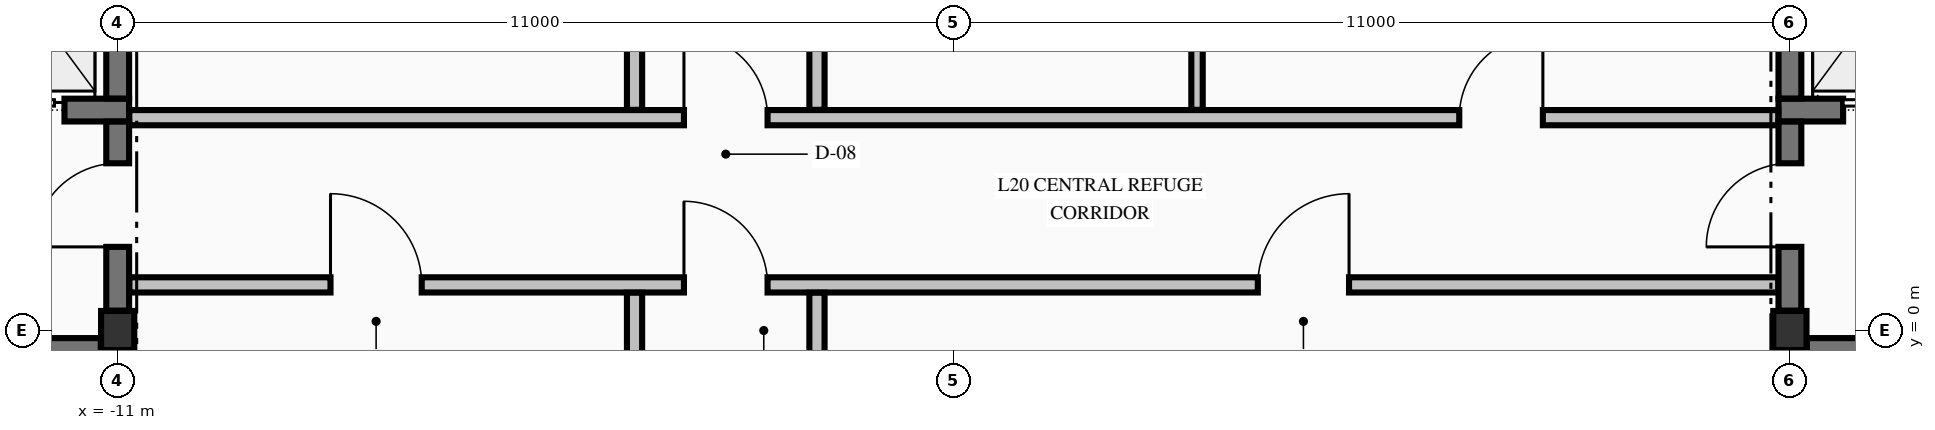
"""IFC4 building model, lengths in metres.
Left out: names, types, materials, properties, quantities, classifications, styles, units other than length and angle.
Written with IfcOpenShell. Run it as: python <this file> out.ifc"""

import sys

from ifc_helpers import new_model, si_unit, direction, frame, frame_2d, origin, origin_2d, place, context, subcontext, project, spatial, rectangle, i_section, extrude, element, fill, save


model = new_model("IFC4")
c1 = context("Model", 3, precision=1e-05, world=origin(), true_north=direction((0.0, 1.0)))
c2 = subcontext(c1, "Body", "Model", "MODEL_VIEW")
j1 = project(units=[si_unit("LENGTHUNIT", "METRE"), si_unit("PLANEANGLEUNIT", "RADIAN")], contexts=[c1])
p1 = place(None, origin())
s1 = spatial("IfcSite", under=j1, at=p1, CompositionType="ELEMENT")
p2 = place(p1, origin())
s2 = spatial("IfcBuilding", under=s1, at=p2, CompositionType="ELEMENT")
p3 = place(p2, frame((0.0, 0.0, 82.18)))
s3 = spatial("IfcBuildingStorey", under=s2, at=p3, CompositionType="ELEMENT", Elevation=82.18)
for number, where, z_axis, x_axis in (
    (1, (-11.0, 0.0, -0.425), (0.0, 0.0, 1.0), (1.0, 0.0, 0.0)),
    (2, (11.0, 0.0, -0.425), (0.0, 0.0, 1.0), (1.0, 0.0, 0.0)),
):
    element("IfcColumn", number, at=place(p3, frame(where, z_axis=z_axis, x_axis=x_axis)), inside=s3, PredefinedType="COLUMN", context=c2, shape_type="SweptSolid", body=[
        extrude(i_section(OverallWidth=0.437, OverallDepth=0.514, WebThickness=0.061, FlangeThickness=0.097, FilletRadius=0.015, at=origin_2d()), origin(), (0.0, 0.0, 1.0), 4.76),
    ])
p4 = place(p3, frame((-19.778, -0.25, 0.0), z_axis=(0.0, 0.0, 1.0), x_axis=(1.0, 0.0, 0.0)))
e3 = element("IfcWall", 3, at=p4, inside=s3, PredefinedType="SHEAR", context=c2, shape_type="SweptSolid", body=[
    extrude(rectangle(XDim=8.555, YDim=0.3, at=frame_2d((4.278, 0.0))), origin(), (0.0, 0.0, 1.0), 4.335),
])
p5 = place(p4, frame((6.077, 0.0, 0.0)))
e4 = element("IfcOpeningElement", 4, at=p5, cuts=e3, PredefinedType="OPENING", context=c2, shape_type="SweptSolid", body=[
    extrude(rectangle(XDim=1.1, YDim=2.15, at=frame_2d((0.55, 1.075))), frame((0.0, 0.16, 0.0), z_axis=(0.0, -1.0, 0.0), x_axis=(1.0, 0.0, 0.0)), (0.0, 0.0, 1.0), 0.32),
])
p6 = place(p3, frame((11.222, -0.25, 0.0), z_axis=(0.0, 0.0, 1.0), x_axis=(1.0, 0.0, 0.0)))
e5 = element("IfcWall", 5, at=p6, inside=s3, PredefinedType="SHEAR", context=c2, shape_type="SweptSolid", body=[
    extrude(rectangle(XDim=3.653, YDim=0.3, at=frame_2d((1.826, 0.0))), origin(), (0.0, 0.0, 1.0), 4.335),
])
p7 = place(p6, frame((1.377, 0.0, 0.0)))
e6 = element("IfcOpeningElement", 6, at=p7, cuts=e5, PredefinedType="OPENING", context=c2, shape_type="SweptSolid", body=[
    extrude(rectangle(XDim=1.1, YDim=2.15, at=frame_2d((0.55, 1.075))), frame((0.0, 0.16, 0.0), z_axis=(0.0, -1.0, 0.0), x_axis=(1.0, 0.0, 0.0)), (0.0, 0.0, 1.0), 0.32),
])
p8 = place(p3, frame((-14.875, 2.9, 0.0), z_axis=(0.0, 0.0, 1.0), x_axis=(1.0, 0.0, 0.0)))
e7 = element("IfcWall", 7, at=p8, inside=s3, PredefinedType="SHEAR", context=c2, shape_type="SweptSolid", body=[
    extrude(rectangle(XDim=4.025, YDim=0.3, at=frame_2d((2.012, 0.0))), origin(), (0.0, 0.0, 1.0), 4.335),
])
p9 = place(p8, frame((2.075, 0.0, 0.0)))
e8 = element("IfcOpeningElement", 8, at=p9, cuts=e7, PredefinedType="OPENING", context=c2, shape_type="SweptSolid", body=[
    extrude(rectangle(XDim=1.1, YDim=2.2, at=frame_2d((0.55, 1.1))), frame((0.0, 0.16, 0.0), z_axis=(0.0, -1.0, 0.0), x_axis=(1.0, 0.0, 0.0)), (0.0, 0.0, 1.0), 0.32),
])
p10 = place(p3, frame((10.85, 2.9, 0.0), z_axis=(0.0, 0.0, 1.0), x_axis=(1.0, 0.0, 0.0)))
e9 = element("IfcWall", 9, at=p10, inside=s3, PredefinedType="SHEAR", context=c2, shape_type="SweptSolid", body=[
    extrude(rectangle(XDim=4.025, YDim=0.3, at=frame_2d((2.012, 0.0))), origin(), (0.0, 0.0, 1.0), 4.335),
])
p11 = place(p10, frame((0.85, 0.0, 0.0)))
e10 = element("IfcOpeningElement", 10, at=p11, cuts=e9, PredefinedType="OPENING", context=c2, shape_type="SweptSolid", body=[
    extrude(rectangle(XDim=1.1, YDim=2.2, at=frame_2d((0.55, 1.1))), frame((0.0, 0.16, 0.0), z_axis=(0.0, -1.0, 0.0), x_axis=(1.0, 0.0, 0.0)), (0.0, 0.0, 1.0), 0.32),
])
p12 = place(p3, frame((-10.847, 0.6, 0.0), z_axis=(0.0, 0.0, 1.0), x_axis=(1.0, 0.0, 0.0)))
e11 = element("IfcWall", 11, at=p12, inside=s3, PredefinedType="PARTITIONING", context=c2, shape_type="SweptSolid", body=[
    extrude(rectangle(XDim=21.694, YDim=0.2, at=frame_2d((10.847, 0.0))), origin(), (0.0, 0.0, 1.0), 4.335),
])
p13 = place(p12, frame((7.297, 0.0, 0.0)))
e12 = element("IfcOpeningElement", 12, at=p13, cuts=e11, PredefinedType="OPENING", context=c2, shape_type="SweptSolid", body=[
    extrude(rectangle(XDim=1.1, YDim=2.15, at=frame_2d((0.55, 1.075))), frame((0.0, 0.11, 0.0), z_axis=(0.0, -1.0, 0.0), x_axis=(1.0, 0.0, 0.0)), (0.0, 0.0, 1.0), 0.22),
])
p14 = place(p12, frame((2.647, 0.0, 0.0)))
e13 = element("IfcOpeningElement", 13, at=p14, cuts=e11, PredefinedType="OPENING", context=c2, shape_type="SweptSolid", body=[
    extrude(rectangle(XDim=1.2, YDim=2.15, at=frame_2d((0.6, 1.075))), frame((0.0, 0.11, 0.0), z_axis=(0.0, -1.0, 0.0), x_axis=(1.0, 0.0, 0.0)), (0.0, 0.0, 1.0), 0.22),
])
p15 = place(p12, frame((14.847, 0.0, 0.0)))
e14 = element("IfcOpeningElement", 14, at=p15, cuts=e11, PredefinedType="OPENING", context=c2, shape_type="SweptSolid", body=[
    extrude(rectangle(XDim=1.2, YDim=2.15, at=frame_2d((0.6, 1.075))), frame((0.0, 0.11, 0.0), z_axis=(0.0, -1.0, 0.0), x_axis=(1.0, 0.0, 0.0)), (0.0, 0.0, 1.0), 0.22),
])
p16 = place(p3, frame((-10.847, 2.8, 0.0), z_axis=(0.0, 0.0, 1.0), x_axis=(1.0, 0.0, 0.0)))
e15 = element("IfcWall", 15, at=p16, inside=s3, PredefinedType="PARTITIONING", context=c2, shape_type="SweptSolid", body=[
    extrude(rectangle(XDim=21.694, YDim=0.2, at=frame_2d((10.847, 0.0))), origin(), (0.0, 0.0, 1.0), 4.335),
])
p17 = place(p16, frame((7.297, 0.0, 0.0)))
e16 = element("IfcOpeningElement", 16, at=p17, cuts=e15, PredefinedType="OPENING", context=c2, shape_type="SweptSolid", body=[
    extrude(rectangle(XDim=1.1, YDim=2.15, at=frame_2d((0.55, 1.075))), frame((0.0, 0.11, 0.0), z_axis=(0.0, -1.0, 0.0), x_axis=(1.0, 0.0, 0.0)), (0.0, 0.0, 1.0), 0.22),
])
p18 = place(p16, frame((17.497, 0.0, 0.0)))
e17 = element("IfcOpeningElement", 17, at=p18, cuts=e15, PredefinedType="OPENING", context=c2, shape_type="SweptSolid", body=[
    extrude(rectangle(XDim=1.1, YDim=2.15, at=frame_2d((0.55, 1.075))), frame((0.0, 0.11, 0.0), z_axis=(0.0, -1.0, 0.0), x_axis=(1.0, 0.0, 0.0)), (0.0, 0.0, 1.0), 0.22),
])
p19 = place(p3, frame((-11.0, 0.261, 0.0), z_axis=(0.0, 0.0, 1.0), x_axis=(0.0, 1.0, 0.0)))
e18 = element("IfcWall", 18, at=p19, inside=s3, PredefinedType="SHEAR", context=c2, shape_type="SweptSolid", body=[
    extrude(rectangle(XDim=2.487, YDim=0.3, at=frame_2d((1.244, 0.0))), origin(), (0.0, 0.0, 1.0), 4.335),
])
p20 = place(p19, frame((0.839, 0.0, 0.0)))
e19 = element("IfcOpeningElement", 19, at=p20, cuts=e18, PredefinedType="OPENING", context=c2, shape_type="SweptSolid", body=[
    extrude(rectangle(XDim=1.1, YDim=2.15, at=frame_2d((0.55, 1.075))), frame((0.0, 0.16, 0.0), z_axis=(0.0, -1.0, 0.0), x_axis=(1.0, 0.0, 0.0)), (0.0, 0.0, 1.0), 0.32),
])
p21 = place(p3, frame((-11.0, 3.052, 0.0), z_axis=(0.0, 0.0, 1.0), x_axis=(0.0, 1.0, 0.0)))
e20 = element("IfcWall", 20, at=p21, inside=s3, PredefinedType="SHEAR", context=c2, shape_type="SweptSolid", body=[
    extrude(rectangle(XDim=2.496, YDim=0.3, at=frame_2d((1.248, 0.0))), origin(), (0.0, 0.0, 1.0), 4.335),
])
p22 = place(p3, frame((11.0, 0.261, 0.0), z_axis=(0.0, 0.0, 1.0), x_axis=(0.0, 1.0, 0.0)))
e21 = element("IfcWall", 21, at=p22, inside=s3, PredefinedType="SHEAR", context=c2, shape_type="SweptSolid", body=[
    extrude(rectangle(XDim=2.487, YDim=0.3, at=frame_2d((1.244, 0.0))), origin(), (0.0, 0.0, 1.0), 4.335),
])
p23 = place(p22, frame((0.839, 0.0, 0.0)))
e22 = element("IfcOpeningElement", 22, at=p23, cuts=e21, PredefinedType="OPENING", context=c2, shape_type="SweptSolid", body=[
    extrude(rectangle(XDim=1.1, YDim=2.15, at=frame_2d((0.55, 1.075))), frame((0.0, 0.16, 0.0), z_axis=(0.0, -1.0, 0.0), x_axis=(1.0, 0.0, 0.0)), (0.0, 0.0, 1.0), 0.32),
])
p24 = place(p3, frame((11.0, 3.052, 0.0), z_axis=(0.0, 0.0, 1.0), x_axis=(0.0, 1.0, 0.0)))
e23 = element("IfcWall", 23, at=p24, inside=s3, PredefinedType="SHEAR", context=c2, shape_type="SweptSolid", body=[
    extrude(rectangle(XDim=2.496, YDim=0.3, at=frame_2d((1.248, 0.0))), origin(), (0.0, 0.0, 1.0), 4.335),
])
p25 = place(p3, frame((-4.2, -9.847, 0.0), z_axis=(0.0, 0.0, 1.0), x_axis=(0.0, 1.0, 0.0)))
e24 = element("IfcWall", 24, at=p25, inside=s3, PredefinedType="PARTITIONING", context=c2, shape_type="SweptSolid", body=[
    extrude(rectangle(XDim=10.344, YDim=0.2, at=frame_2d((5.172, 0.0))), origin(), (0.0, 0.0, 1.0), 4.335),
])
p26 = place(p3, frame((-4.2, 2.903, 0.0), z_axis=(0.0, 0.0, 1.0), x_axis=(0.0, 1.0, 0.0)))
e25 = element("IfcWall", 25, at=p26, inside=s3, PredefinedType="PARTITIONING", context=c2, shape_type="SweptSolid", body=[
    extrude(rectangle(XDim=3.644, YDim=0.2, at=frame_2d((1.822, 0.0))), origin(), (0.0, 0.0, 1.0), 4.335),
])
p27 = place(p26, frame((1.322, 0.0, 0.0)))
e26 = element("IfcOpeningElement", 26, at=p27, cuts=e25, PredefinedType="OPENING", context=c2, shape_type="SweptSolid", body=[
    extrude(rectangle(XDim=0.95, YDim=2.15, at=frame_2d((0.475, 1.075))), frame((0.0, 0.11, 0.0), z_axis=(0.0, -1.0, 0.0), x_axis=(1.0, 0.0, 0.0)), (0.0, 0.0, 1.0), 0.22),
])
p28 = place(p3, frame((-1.8, -9.847, 0.0), z_axis=(0.0, 0.0, 1.0), x_axis=(0.0, 1.0, 0.0)))
e27 = element("IfcWall", 27, at=p28, inside=s3, PredefinedType="PARTITIONING", context=c2, shape_type="SweptSolid", body=[
    extrude(rectangle(XDim=10.344, YDim=0.2, at=frame_2d((5.172, 0.0))), origin(), (0.0, 0.0, 1.0), 4.335),
])
p29 = place(p3, frame((-1.8, 2.903, 0.0), z_axis=(0.0, 0.0, 1.0), x_axis=(0.0, 1.0, 0.0)))
e28 = element("IfcWall", 28, at=p29, inside=s3, PredefinedType="PARTITIONING", context=c2, shape_type="SweptSolid", body=[
    extrude(rectangle(XDim=3.594, YDim=0.2, at=frame_2d((1.797, 0.0))), origin(), (0.0, 0.0, 1.0), 4.335),
])
p30 = place(p29, frame((1.322, 0.0, 0.0)))
e29 = element("IfcOpeningElement", 29, at=p30, cuts=e28, PredefinedType="OPENING", context=c2, shape_type="SweptSolid", body=[
    extrude(rectangle(XDim=0.95, YDim=2.15, at=frame_2d((0.475, 1.075))), frame((0.0, 0.11, 0.0), z_axis=(0.0, -1.0, 0.0), x_axis=(1.0, 0.0, 0.0)), (0.0, 0.0, 1.0), 0.22),
])
p31 = place(p3, frame((3.2, 2.903, 0.0), z_axis=(0.0, 0.0, 1.0), x_axis=(0.0, 1.0, 0.0)))
e30 = element("IfcWall", 30, at=p31, inside=s3, PredefinedType="PARTITIONING", context=c2, shape_type="SweptSolid", body=[
    extrude(rectangle(XDim=3.594, YDim=0.15, at=frame_2d((1.797, 0.0))), origin(), (0.0, 0.0, 1.0), 4.335),
])
p32 = place(p20, origin())
e31 = element("IfcDoor", 31, at=p32, inside=s3, OperationType="SINGLE_SWING_LEFT", PredefinedType="DOOR", context=c2, shape_type="SweptSolid", body=[
    extrude(rectangle(XDim=1.1, YDim=2.15, at=frame_2d((0.55, 1.075))), frame((0.0, 0.025, 0.0), z_axis=(0.0, -1.0, 0.0), x_axis=(1.0, 0.0, 0.0)), (0.0, 0.0, 1.0), 0.05),
])
fill(e19, e31)
p33 = place(p9, origin())
e32 = element("IfcDoor", 32, at=p33, inside=s3, OperationType="SLIDING_TO_LEFT", PredefinedType="DOOR", context=c2, shape_type="SweptSolid", body=[
    extrude(rectangle(XDim=1.1, YDim=2.2, at=frame_2d((0.55, 1.1))), frame((0.0, 0.025, 0.0), z_axis=(0.0, -1.0, 0.0), x_axis=(1.0, 0.0, 0.0)), (0.0, 0.0, 1.0), 0.05),
])
fill(e8, e32)
p34 = place(p23, origin())
e33 = element("IfcDoor", 33, at=p34, inside=s3, OperationType="SINGLE_SWING_LEFT", PredefinedType="DOOR", context=c2, shape_type="SweptSolid", body=[
    extrude(rectangle(XDim=1.1, YDim=2.15, at=frame_2d((0.55, 1.075))), frame((0.0, 0.025, 0.0), z_axis=(0.0, -1.0, 0.0), x_axis=(1.0, 0.0, 0.0)), (0.0, 0.0, 1.0), 0.05),
])
fill(e22, e33)
p35 = place(p11, origin())
e34 = element("IfcDoor", 34, at=p35, inside=s3, OperationType="SLIDING_TO_RIGHT", PredefinedType="DOOR", context=c2, shape_type="SweptSolid", body=[
    extrude(rectangle(XDim=1.1, YDim=2.2, at=frame_2d((0.55, 1.1))), frame((0.0, 0.025, 0.0), z_axis=(0.0, -1.0, 0.0), x_axis=(1.0, 0.0, 0.0)), (0.0, 0.0, 1.0), 0.05),
])
fill(e10, e34)
p36 = place(p17, origin())
e35 = element("IfcDoor", 35, at=p36, inside=s3, OperationType="SINGLE_SWING_LEFT", PredefinedType="DOOR", context=c2, shape_type="SweptSolid", body=[
    extrude(rectangle(XDim=1.1, YDim=2.15, at=frame_2d((0.55, 1.075))), frame((0.0, 0.025, 0.0), z_axis=(0.0, -1.0, 0.0), x_axis=(1.0, 0.0, 0.0)), (0.0, 0.0, 1.0), 0.05),
])
fill(e16, e35)
p37 = place(p13, origin())
e36 = element("IfcDoor", 36, at=p37, inside=s3, OperationType="SINGLE_SWING_LEFT", PredefinedType="DOOR", context=c2, shape_type="SweptSolid", body=[
    extrude(rectangle(XDim=1.1, YDim=2.15, at=frame_2d((0.55, 1.075))), frame((0.0, 0.025, 0.0), z_axis=(0.0, -1.0, 0.0), x_axis=(1.0, 0.0, 0.0)), (0.0, 0.0, 1.0), 0.05),
])
fill(e12, e36)
p38 = place(p14, origin())
e37 = element("IfcDoor", 37, at=p38, inside=s3, OperationType="SINGLE_SWING_LEFT", PredefinedType="DOOR", context=c2, shape_type="SweptSolid", body=[
    extrude(rectangle(XDim=1.2, YDim=2.15, at=frame_2d((0.6, 1.075))), frame((0.0, 0.025, 0.0), z_axis=(0.0, -1.0, 0.0), x_axis=(1.0, 0.0, 0.0)), (0.0, 0.0, 1.0), 0.05),
])
fill(e13, e37)
p39 = place(p15, origin())
e38 = element("IfcDoor", 38, at=p39, inside=s3, OperationType="SINGLE_SWING_RIGHT", PredefinedType="DOOR", context=c2, shape_type="SweptSolid", body=[
    extrude(rectangle(XDim=1.2, YDim=2.15, at=frame_2d((0.6, 1.075))), frame((0.0, 0.025, 0.0), z_axis=(0.0, -1.0, 0.0), x_axis=(1.0, 0.0, 0.0)), (0.0, 0.0, 1.0), 0.05),
])
fill(e14, e38)
p40 = place(p18, origin())
e39 = element("IfcDoor", 39, at=p40, inside=s3, OperationType="SINGLE_SWING_RIGHT", PredefinedType="DOOR", context=c2, shape_type="SweptSolid", body=[
    extrude(rectangle(XDim=1.1, YDim=2.15, at=frame_2d((0.55, 1.075))), frame((0.0, 0.025, 0.0), z_axis=(0.0, -1.0, 0.0), x_axis=(1.0, 0.0, 0.0)), (0.0, 0.0, 1.0), 0.05),
])
fill(e17, e39)
save(model, sys.argv[1])
